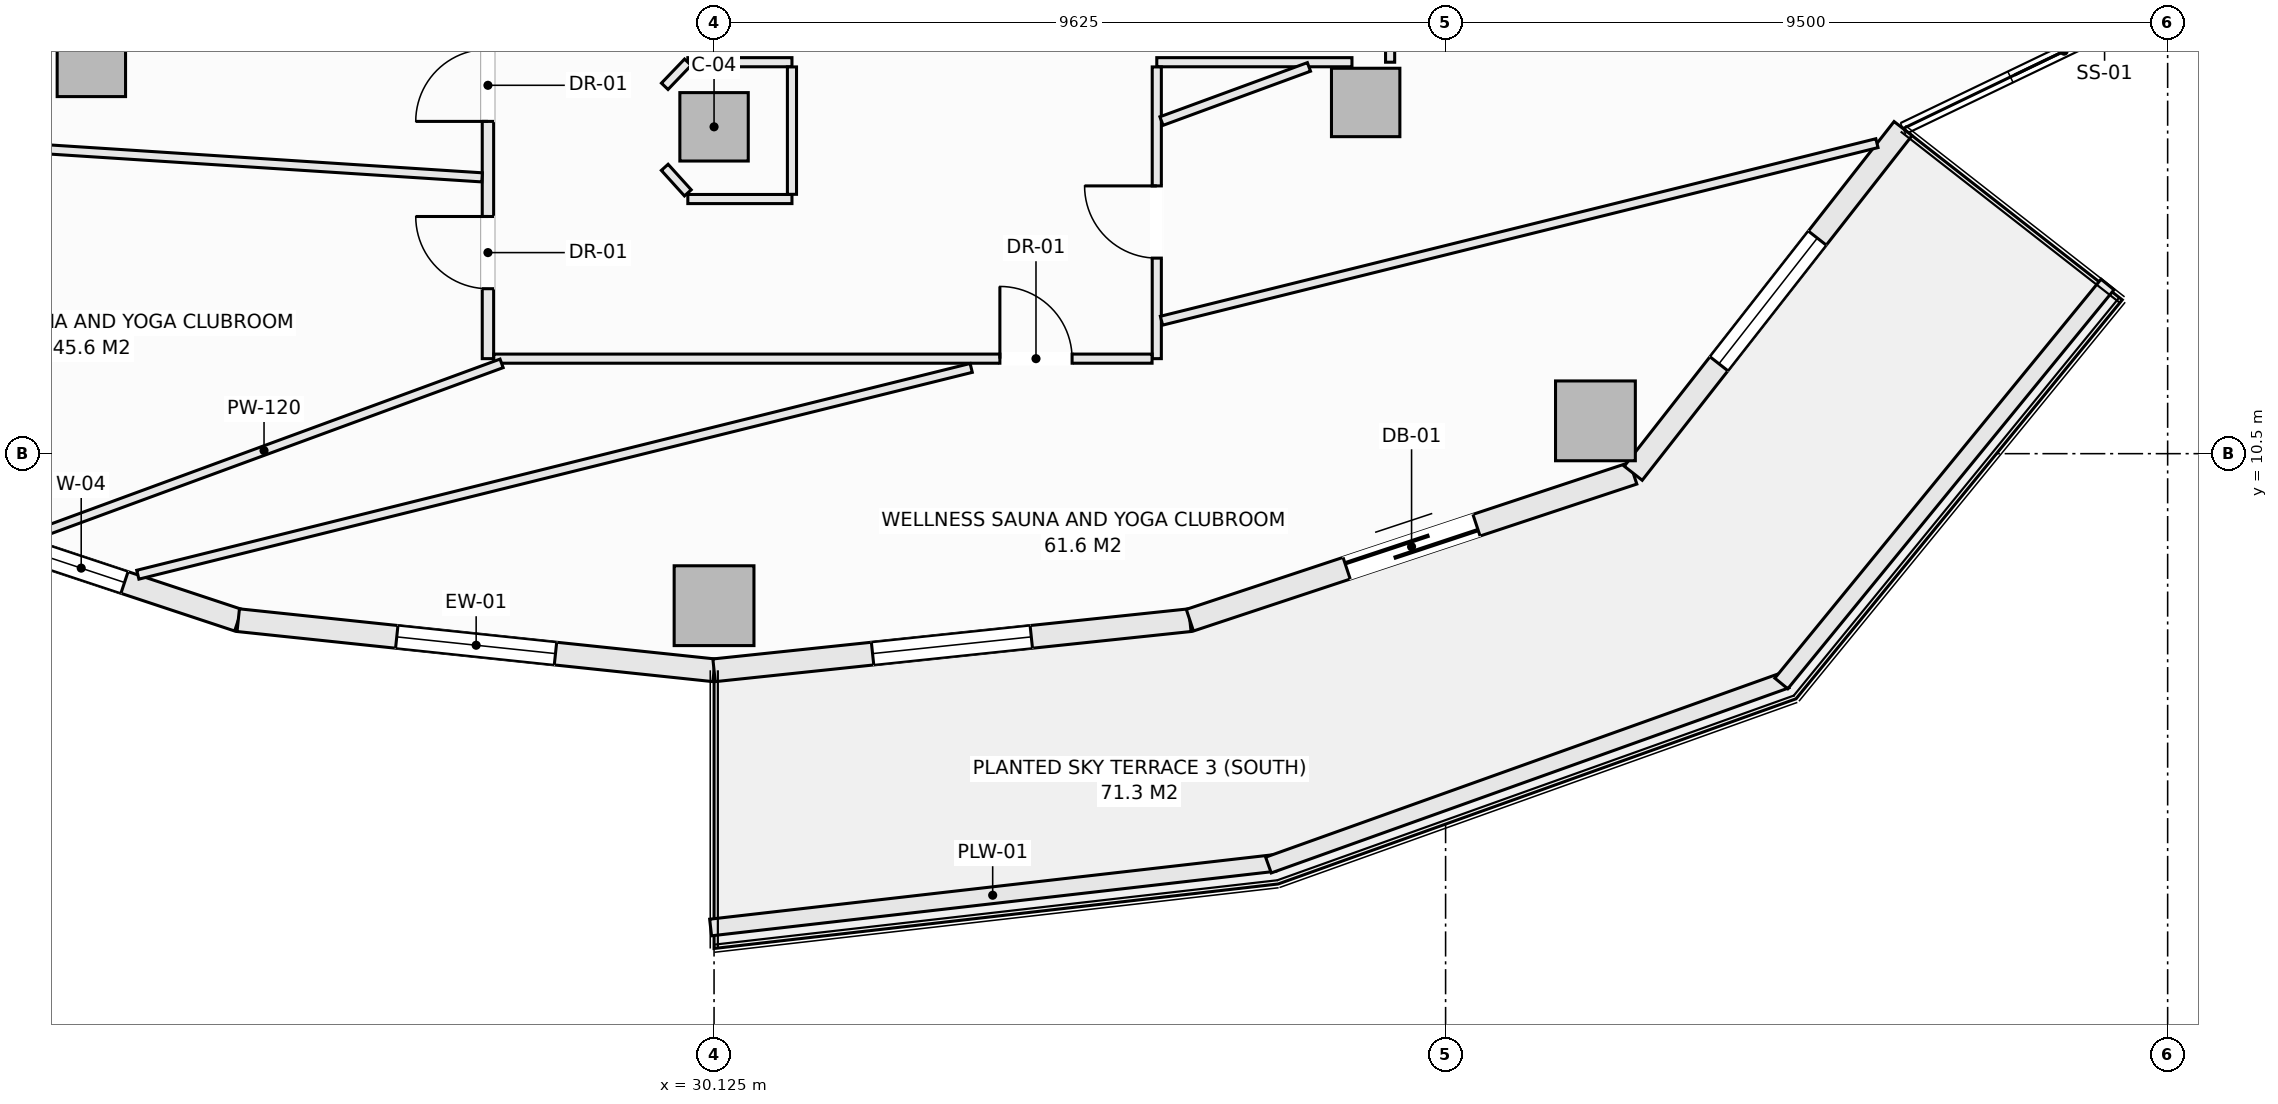
"""IFC4 building model, lengths in metres.
Left out: names, types, materials, properties, quantities, classifications, styles, units other than length and angle.
Written with IfcOpenShell. Run it as: python <this file> out.ifc"""

import sys

from ifc_helpers import new_model, si_unit, direction, frame, frame_2d, origin, origin_2d, place, context, subcontext, project, spatial, rectangle, extrude, element, fill, save


model = new_model("IFC4")
c1 = context("Model", 3, precision=1e-05, world=origin(), true_north=direction((0.0, 1.0)))
c2 = subcontext(c1, "Body", "Model", "MODEL_VIEW")
j1 = project(units=[si_unit("LENGTHUNIT", "METRE"), si_unit("PLANEANGLEUNIT", "RADIAN")], contexts=[c1])
p1 = place(None, origin())
s1 = spatial("IfcSite", under=j1, at=p1, CompositionType="ELEMENT")
p2 = place(p1, origin())
s2 = spatial("IfcBuilding", under=s1, at=p2, CompositionType="ELEMENT")
p3 = place(p2, frame((0.0, 0.0, 129.1)))
s3 = spatial("IfcBuildingStorey", under=s2, at=p3, CompositionType="ELEMENT", Elevation=129.1)
for number, where, z_axis, x_axis in (
    (1, (30.125, 8.5, -0.27), (0.0, 0.0, 1.0), (1.0, 0.0, 0.0)),
    (2, (41.721, 10.932, -0.27), (0.0, 0.0, 1.0), (1.0, 0.0, 0.0)),
):
    element("IfcColumn", number, at=place(p3, frame(where, z_axis=z_axis, x_axis=x_axis)), inside=s3, PredefinedType="COLUMN", context=c2, shape_type="SweptSolid", body=[
        extrude(rectangle(XDim=1.05, YDim=1.05, at=origin_2d()), origin(), (0.0, 0.0, 1.0), 3.4),
    ])
for number, where, z_axis, x_axis in (
    (3, (21.932, 15.648, -0.27), (0.0, 0.0, 1.0), (1.0, 0.0, 0.0)),
    (4, (30.125, 14.8, -0.27), (0.0, 0.0, 1.0), (1.0, 0.0, 0.0)),
    (5, (38.698, 15.121, -0.27), (0.0, 0.0, 1.0), (1.0, 0.0, 0.0)),
):
    element("IfcColumn", number, at=place(p3, frame(where, z_axis=z_axis, x_axis=x_axis)), inside=s3, PredefinedType="COLUMN", context=c2, shape_type="SweptSolid", body=[
        extrude(rectangle(XDim=0.9, YDim=0.9, at=origin_2d()), origin(), (0.0, 0.0, 1.0), 3.4),
    ])
p4 = place(p3, frame((18.031, 10.242, 0.0), z_axis=(0.0, 0.0, 1.0), x_axis=(0.949238009374, -0.314558741032, 0.0)))
e6 = element("IfcWall", 6, at=p4, inside=s3, PredefinedType="SOLIDWALL", context=c2, shape_type="SweptSolid", body=[
    extrude(rectangle(XDim=6.146, YDim=0.3, at=frame_2d((3.073, 0.0))), origin(), (0.0, 0.0, 1.0), 2.653),
])
p5 = place(p4, frame((1.83, 0.0, 0.74)))
e7 = element("IfcOpeningElement", 7, at=p5, cuts=e6, PredefinedType="OPENING", context=c2, shape_type="SweptSolid", body=[
    extrude(rectangle(XDim=1.2, YDim=1.7, at=frame_2d((0.6, 0.85))), frame((0.0, 0.16, 0.0), z_axis=(0.0, -1.0, 0.0), x_axis=(1.0, 0.0, 0.0)), (0.0, 0.0, 1.0), 0.32),
])
p6 = place(p4, frame((3.369, 0.0, 0.74)))
e8 = element("IfcOpeningElement", 8, at=p6, cuts=e6, PredefinedType="OPENING", context=c2, shape_type="SweptSolid", body=[
    extrude(rectangle(XDim=1.2, YDim=1.7, at=frame_2d((0.6, 0.85))), frame((0.0, 0.16, 0.0), z_axis=(0.0, -1.0, 0.0), x_axis=(1.0, 0.0, 0.0)), (0.0, 0.0, 1.0), 0.32),
])
p7 = place(p3, frame((23.865, 8.309, 0.0), z_axis=(0.0, 0.0, 1.0), x_axis=(0.994498012394, -0.104755445421, 0.0)))
e9 = element("IfcWall", 9, at=p7, inside=s3, PredefinedType="SOLIDWALL", context=c2, shape_type="SweptSolid", body=[
    extrude(rectangle(XDim=6.295, YDim=0.3, at=frame_2d((3.147, 0.0))), origin(), (0.0, 0.0, 1.0), 2.653),
])
p8 = place(p7, frame((2.097, 0.0, 0.74)))
e10 = element("IfcOpeningElement", 10, at=p8, cuts=e9, PredefinedType="OPENING", context=c2, shape_type="SweptSolid", body=[
    extrude(rectangle(XDim=2.1, YDim=1.7, at=frame_2d((1.05, 0.85))), frame((0.0, 0.16, 0.0), z_axis=(0.0, -1.0, 0.0), x_axis=(1.0, 0.0, 0.0)), (0.0, 0.0, 1.0), 0.32),
])
p9 = place(p3, frame((30.125, 7.65, 0.0), z_axis=(0.0, 0.0, 1.0), x_axis=(0.994498012394, 0.104755445421, 0.0)))
e11 = element("IfcWall", 11, at=p9, inside=s3, PredefinedType="SOLIDWALL", context=c2, shape_type="SweptSolid", body=[
    extrude(rectangle(XDim=6.295, YDim=0.3, at=frame_2d((3.147, 0.0))), origin(), (0.0, 0.0, 1.0), 2.653),
])
p10 = place(p9, frame((2.097, 0.0, 0.74)))
e12 = element("IfcOpeningElement", 12, at=p10, cuts=e11, PredefinedType="OPENING", context=c2, shape_type="SweptSolid", body=[
    extrude(rectangle(XDim=2.1, YDim=1.7, at=frame_2d((1.05, 0.85))), frame((0.0, 0.16, 0.0), z_axis=(0.0, -1.0, 0.0), x_axis=(1.0, 0.0, 0.0)), (0.0, 0.0, 1.0), 0.32),
])
p11 = place(p3, frame((36.385, 8.309, 0.0), z_axis=(0.0, 0.0, 1.0), x_axis=(0.949238009374, 0.314558741032, 0.0)))
e13 = element("IfcWall", 13, at=p11, inside=s3, PredefinedType="SOLIDWALL", context=c2, shape_type="SweptSolid", body=[
    extrude(rectangle(XDim=6.146, YDim=0.3, at=frame_2d((3.073, 0.0))), origin(), (0.0, 0.0, 1.0), 2.653),
])
p12 = place(p11, frame((2.173, 0.0, 0.0)))
e14 = element("IfcOpeningElement", 14, at=p12, cuts=e13, PredefinedType="OPENING", context=c2, shape_type="SweptSolid", body=[
    extrude(rectangle(XDim=1.8, YDim=2.25, at=frame_2d((0.9, 1.125))), frame((0.0, 0.16, 0.0), z_axis=(0.0, -1.0, 0.0), x_axis=(1.0, 0.0, 0.0)), (0.0, 0.0, 1.0), 0.32),
])
p13 = place(p3, frame((42.219, 10.242, 0.0), z_axis=(0.0, 0.0, 1.0), x_axis=(0.616435134162, 0.787405693001, 0.0)))
e15 = element("IfcWall", 15, at=p13, inside=s3, PredefinedType="SOLIDWALL", context=c2, shape_type="SweptSolid", body=[
    extrude(rectangle(XDim=5.759, YDim=0.3, at=frame_2d((2.879, 0.0))), origin(), (0.0, 0.0, 1.0), 2.653),
])
p14 = place(p13, frame((1.829, 0.0, 0.74)))
e16 = element("IfcOpeningElement", 16, at=p14, cuts=e15, PredefinedType="OPENING", context=c2, shape_type="SweptSolid", body=[
    extrude(rectangle(XDim=2.1, YDim=1.7, at=frame_2d((1.05, 0.85))), frame((0.0, 0.16, 0.0), z_axis=(0.0, -1.0, 0.0), x_axis=(1.0, 0.0, 0.0)), (0.0, 0.0, 1.0), 0.32),
])
p15 = place(p3, frame((30.08, 4.266, 0.0), z_axis=(0.0, 0.0, 1.0), x_axis=(0.993527615836, 0.11359082961, 0.0)))
e17 = element("IfcWall", 17, at=p15, inside=s3, PredefinedType="PARAPET", context=c2, shape_type="SweptSolid", body=[
    extrude(rectangle(XDim=7.471, YDim=0.22, at=frame_2d((3.735, 0.0))), origin(), (0.0, 0.0, 1.0), 0.52),
])
p16 = place(p3, frame((37.419, 5.087, 0.0), z_axis=(0.0, 0.0, 1.0), x_axis=(0.941632697311, 0.336642040387, 0.0)))
e18 = element("IfcWall", 18, at=p16, inside=s3, PredefinedType="PARAPET", context=c2, shape_type="SweptSolid", body=[
    extrude(rectangle(XDim=7.236, YDim=0.22, at=frame_2d((3.618, 0.0))), origin(), (0.0, 0.0, 1.0), 0.52),
])
p17 = place(p3, frame((44.167, 7.477, 0.0), z_axis=(0.0, 0.0, 1.0), x_axis=(0.633002467947, 0.77414977593, 0.0)))
e19 = element("IfcWall", 19, at=p17, inside=s3, PredefinedType="PARAPET", context=c2, shape_type="SweptSolid", body=[
    extrude(rectangle(XDim=6.78, YDim=0.22, at=frame_2d((3.39, 0.0))), origin(), (0.0, 0.0, 1.0), 0.52),
])
p18 = place(p3, frame((27.15, 11.75, 0.0), z_axis=(0.0, 0.0, 1.0), x_axis=(0.0, 1.0, 0.0)))
e20 = element("IfcWall", 20, at=p18, inside=s3, PredefinedType="PARTITIONING", context=c2, shape_type="SweptSolid", body=[
    extrude(rectangle(XDim=5.223, YDim=0.15, at=frame_2d((2.611, 0.0))), origin(), (0.0, 0.0, 1.0), 3.13),
])
p19 = place(p18, frame((3.121, 0.0, 0.0)))
e21 = element("IfcOpeningElement", 21, at=p19, cuts=e20, PredefinedType="OPENING", context=c2, shape_type="SweptSolid", body=[
    extrude(rectangle(XDim=0.95, YDim=2.1, at=frame_2d((0.475, 1.05))), frame((0.0, 0.085, 0.0), z_axis=(0.0, -1.0, 0.0), x_axis=(1.0, 0.0, 0.0)), (0.0, 0.0, 1.0), 0.17),
])
p20 = place(p18, frame((0.92, 0.0, 0.0)))
e22 = element("IfcOpeningElement", 22, at=p20, cuts=e20, PredefinedType="OPENING", context=c2, shape_type="SweptSolid", body=[
    extrude(rectangle(XDim=0.95, YDim=2.1, at=frame_2d((0.475, 1.05))), frame((0.0, 0.085, 0.0), z_axis=(0.0, -1.0, 0.0), x_axis=(1.0, 0.0, 0.0)), (0.0, 0.0, 1.0), 0.17),
])
p21 = place(p3, frame((39.02, 15.65, 0.0), z_axis=(0.0, 0.0, 1.0), x_axis=(0.0, 1.0, 0.0)))
e23 = element("IfcWall", 23, at=p21, inside=s3, PredefinedType="PARTITIONING", context=c2, shape_type="SweptSolid", body=[
    extrude(rectangle(XDim=1.36, YDim=0.12, at=frame_2d((0.68, 0.0))), origin(), (0.0, 0.0, 1.0), 2.505),
])
p22 = place(p3, frame((29.78, 15.65, 0.0), z_axis=(0.0, 0.0, 1.0), x_axis=(1.0, 0.0, 0.0)))
e24 = element("IfcWall", 24, at=p22, inside=s3, PredefinedType="PARTITIONING", context=c2, shape_type="SweptSolid", body=[
    extrude(rectangle(XDim=1.37, YDim=0.12, at=frame_2d((0.685, 0.0))), origin(), (0.0, 0.0, 1.0), 3.13),
])
p23 = place(p3, frame((35.95, 15.65, 0.0), z_axis=(0.0, 0.0, 1.0), x_axis=(1.0, 0.0, 0.0)))
e25 = element("IfcWall", 25, at=p23, inside=s3, PredefinedType="PARTITIONING", context=c2, shape_type="SweptSolid", body=[
    extrude(rectangle(XDim=2.568, YDim=0.12, at=frame_2d((1.284, 0.0))), origin(), (0.0, 0.0, 1.0), 3.13),
])
p24 = place(p3, frame((35.95, 11.75, 0.0), z_axis=(0.0, 0.0, 1.0), x_axis=(0.0, 1.0, 0.0)))
e26 = element("IfcWall", 26, at=p24, inside=s3, PredefinedType="PARTITIONING", context=c2, shape_type="SweptSolid", body=[
    extrude(rectangle(XDim=3.838, YDim=0.12, at=frame_2d((1.919, 0.0))), origin(), (0.0, 0.0, 1.0), 3.13),
])
p25 = place(p24, frame((1.323, 0.0, 0.0)))
e27 = element("IfcOpeningElement", 27, at=p25, cuts=e26, PredefinedType="OPENING", context=c2, shape_type="SweptSolid", body=[
    extrude(rectangle(XDim=0.95, YDim=2.1, at=frame_2d((0.475, 1.05))), frame((0.0, 0.07, 0.0), z_axis=(0.0, -1.0, 0.0), x_axis=(1.0, 0.0, 0.0)), (0.0, 0.0, 1.0), 0.14),
])
p26 = place(p3, frame((27.227, 11.75, 0.0), z_axis=(0.0, 0.0, 1.0), x_axis=(1.0, 0.0, 0.0)))
e28 = element("IfcWall", 28, at=p26, inside=s3, PredefinedType="PARTITIONING", context=c2, shape_type="SweptSolid", body=[
    extrude(rectangle(XDim=8.661, YDim=0.12, at=frame_2d((4.331, 0.0))), origin(), (0.0, 0.0, 1.0), 3.13),
])
p27 = place(p26, frame((6.659, 0.0, 0.0)))
e29 = element("IfcOpeningElement", 29, at=p27, cuts=e28, PredefinedType="OPENING", context=c2, shape_type="SweptSolid", body=[
    extrude(rectangle(XDim=0.95, YDim=2.1, at=frame_2d((0.475, 1.05))), frame((0.0, 0.07, 0.0), z_axis=(0.0, -1.0, 0.0), x_axis=(1.0, 0.0, 0.0)), (0.0, 0.0, 1.0), 0.14),
])
p28 = place(p3, frame((29.476, 15.333, 0.0), z_axis=(0.0, 0.0, 1.0), x_axis=(0.692219273951, 0.721687243043, 0.0)))
e30 = element("IfcWall", 30, at=p28, inside=s3, PredefinedType="PARTITIONING", context=c2, shape_type="SweptSolid", body=[
    extrude(rectangle(XDim=0.439, YDim=0.12, at=frame_2d((0.22, 0.0))), origin(), (0.0, 0.0, 1.0), 3.13),
])
p29 = place(p3, frame((29.476, 14.267, 0.0), z_axis=(0.0, 0.0, 1.0), x_axis=(0.670659392016, -0.741765448037, 0.0)))
e31 = element("IfcWall", 31, at=p29, inside=s3, PredefinedType="PARTITIONING", context=c2, shape_type="SweptSolid", body=[
    extrude(rectangle(XDim=0.453, YDim=0.12, at=frame_2d((0.227, 0.0))), origin(), (0.0, 0.0, 1.0), 3.13),
])
p30 = place(p3, frame((29.78, 13.85, 0.0), z_axis=(0.0, 0.0, 1.0), x_axis=(1.0, 0.0, 0.0)))
e32 = element("IfcWall", 32, at=p30, inside=s3, PredefinedType="PARTITIONING", context=c2, shape_type="SweptSolid", body=[
    extrude(rectangle(XDim=1.37, YDim=0.12, at=frame_2d((0.685, 0.0))), origin(), (0.0, 0.0, 1.0), 3.13),
])
p31 = place(p3, frame((31.15, 13.912, 0.0), z_axis=(0.0, 0.0, 1.0), x_axis=(0.0, 1.0, 0.0)))
e33 = element("IfcWall", 33, at=p31, inside=s3, PredefinedType="PARTITIONING", context=c2, shape_type="SweptSolid", body=[
    extrude(rectangle(XDim=1.676, YDim=0.12, at=frame_2d((0.838, 0.0))), origin(), (0.0, 0.0, 1.0), 3.13),
])
p32 = place(p3, frame((14.479, 14.947, 0.0), z_axis=(0.0, 0.0, 1.0), x_axis=(0.997930277746, -0.064305215633, 0.0)))
e34 = element("IfcWall", 34, at=p32, inside=s3, PredefinedType="PARTITIONING", context=c2, shape_type="SweptSolid", body=[
    extrude(rectangle(XDim=12.62, YDim=0.12, at=frame_2d((6.31, 0.0))), origin(), (0.0, 0.0, 1.0), 2.812),
])
p33 = place(p3, frame((21.078, 9.393, 0.0), z_axis=(0.0, 0.0, 1.0), x_axis=(0.938728109135, 0.344658580511, 0.0)))
e35 = element("IfcWall", 35, at=p33, inside=s3, PredefinedType="PARTITIONING", context=c2, shape_type="SweptSolid", body=[
    extrude(rectangle(XDim=6.659, YDim=0.12, at=frame_2d((3.33, 0.0))), origin(), (0.0, 0.0, 1.0), 2.653),
])
p34 = place(p3, frame((36.012, 14.876, 0.0), z_axis=(0.0, 0.0, 1.0), x_axis=(0.938757901669, 0.344577425339, 0.0)))
e36 = element("IfcWall", 36, at=p34, inside=s3, PredefinedType="PARTITIONING", context=c2, shape_type="SweptSolid", body=[
    extrude(rectangle(XDim=2.067, YDim=0.12, at=frame_2d((1.033, 0.0))), origin(), (0.0, 0.0, 1.0), 2.505),
])
p35 = place(p3, frame((22.543, 8.907, 0.0), z_axis=(0.0, 0.0, 1.0), x_axis=(0.970574423873, 0.240801344938, 0.0)))
e37 = element("IfcWall", 37, at=p35, inside=s3, PredefinedType="PARTITIONING", context=c2, shape_type="SweptSolid", body=[
    extrude(rectangle(XDim=11.298, YDim=0.12, at=frame_2d((5.649, 0.0))), origin(), (0.0, 0.0, 1.0), 2.653),
])
p36 = place(p3, frame((36.012, 12.249, 0.0), z_axis=(0.0, 0.0, 1.0), x_axis=(0.970568919411, 0.24082353015, 0.0)))
e38 = element("IfcWall", 38, at=p36, inside=s3, PredefinedType="PARTITIONING", context=c2, shape_type="SweptSolid", body=[
    extrude(rectangle(XDim=9.699, YDim=0.12, at=frame_2d((4.849, 0.0))), origin(), (0.0, 0.0, 1.0), 3.13),
])
p37 = place(p8, origin())
e39 = element("IfcWindow", 39, at=p37, inside=s3, PartitioningType="SINGLE_PANEL", PredefinedType="WINDOW", context=c2, shape_type="SweptSolid", body=[
    extrude(rectangle(XDim=2.1, YDim=1.7, at=frame_2d((1.05, 0.85))), frame((0.0, 0.03, 0.0), z_axis=(0.0, -1.0, 0.0), x_axis=(1.0, 0.0, 0.0)), (0.0, 0.0, 1.0), 0.06),
])
fill(e10, e39)
p38 = place(p10, origin())
e40 = element("IfcWindow", 40, at=p38, inside=s3, PartitioningType="SINGLE_PANEL", PredefinedType="WINDOW", context=c2, shape_type="SweptSolid", body=[
    extrude(rectangle(XDim=2.1, YDim=1.7, at=frame_2d((1.05, 0.85))), frame((0.0, 0.03, 0.0), z_axis=(0.0, -1.0, 0.0), x_axis=(1.0, 0.0, 0.0)), (0.0, 0.0, 1.0), 0.06),
])
fill(e12, e40)
p39 = place(p12, frame((1.8, 0.0, 0.0), z_axis=(0.0, 0.0, 1.0), x_axis=(-1.0, 0.0, 0.0)))
e41 = element("IfcDoor", 41, at=p39, inside=s3, OperationType="SLIDING_TO_LEFT", PredefinedType="DOOR", context=c2, shape_type="SweptSolid", body=[
    extrude(rectangle(XDim=1.8, YDim=2.25, at=frame_2d((0.9, 1.125))), frame((0.0, 0.025, 0.0), z_axis=(0.0, -1.0, 0.0), x_axis=(1.0, 0.0, 0.0)), (0.0, 0.0, 1.0), 0.05),
])
fill(e14, e41)
p40 = place(p14, origin())
e42 = element("IfcWindow", 42, at=p40, inside=s3, PartitioningType="SINGLE_PANEL", PredefinedType="WINDOW", context=c2, shape_type="SweptSolid", body=[
    extrude(rectangle(XDim=2.1, YDim=1.7, at=frame_2d((1.05, 0.85))), frame((0.0, 0.03, 0.0), z_axis=(0.0, -1.0, 0.0), x_axis=(1.0, 0.0, 0.0)), (0.0, 0.0, 1.0), 0.06),
])
fill(e16, e42)
p41 = place(p19, origin())
e43 = element("IfcDoor", 43, at=p41, inside=s3, OperationType="SINGLE_SWING_LEFT", PredefinedType="DOOR", context=c2, shape_type="SweptSolid", body=[
    extrude(rectangle(XDim=0.95, YDim=2.1, at=frame_2d((0.475, 1.05))), frame((0.0, 0.025, 0.0), z_axis=(0.0, -1.0, 0.0), x_axis=(1.0, 0.0, 0.0)), (0.0, 0.0, 1.0), 0.05),
])
fill(e21, e43)
p42 = place(p20, origin())
e44 = element("IfcDoor", 44, at=p42, inside=s3, OperationType="SINGLE_SWING_RIGHT", PredefinedType="DOOR", context=c2, shape_type="SweptSolid", body=[
    extrude(rectangle(XDim=0.95, YDim=2.1, at=frame_2d((0.475, 1.05))), frame((0.0, 0.025, 0.0), z_axis=(0.0, -1.0, 0.0), x_axis=(1.0, 0.0, 0.0)), (0.0, 0.0, 1.0), 0.05),
])
fill(e22, e44)
p43 = place(p27, origin())
e45 = element("IfcDoor", 45, at=p43, inside=s3, OperationType="SINGLE_SWING_LEFT", PredefinedType="DOOR", context=c2, shape_type="SweptSolid", body=[
    extrude(rectangle(XDim=0.95, YDim=2.1, at=frame_2d((0.475, 1.05))), frame((0.0, 0.025, 0.0), z_axis=(0.0, -1.0, 0.0), x_axis=(1.0, 0.0, 0.0)), (0.0, 0.0, 1.0), 0.05),
])
fill(e29, e45)
p44 = place(p25, origin())
e46 = element("IfcDoor", 46, at=p44, inside=s3, OperationType="SINGLE_SWING_RIGHT", PredefinedType="DOOR", context=c2, shape_type="SweptSolid", body=[
    extrude(rectangle(XDim=0.95, YDim=2.1, at=frame_2d((0.475, 1.05))), frame((0.0, 0.025, 0.0), z_axis=(0.0, -1.0, 0.0), x_axis=(1.0, 0.0, 0.0)), (0.0, 0.0, 1.0), 0.05),
])
fill(e27, e46)
p45 = place(p6, origin())
e47 = element("IfcWindow", 47, at=p45, inside=s3, PartitioningType="SINGLE_PANEL", PredefinedType="WINDOW", context=c2, shape_type="SweptSolid", body=[
    extrude(rectangle(XDim=1.2, YDim=1.7, at=frame_2d((0.6, 0.85))), frame((0.0, 0.03, 0.0), z_axis=(0.0, -1.0, 0.0), x_axis=(1.0, 0.0, 0.0)), (0.0, 0.0, 1.0), 0.06),
])
fill(e8, e47)
save(model, sys.argv[1])
